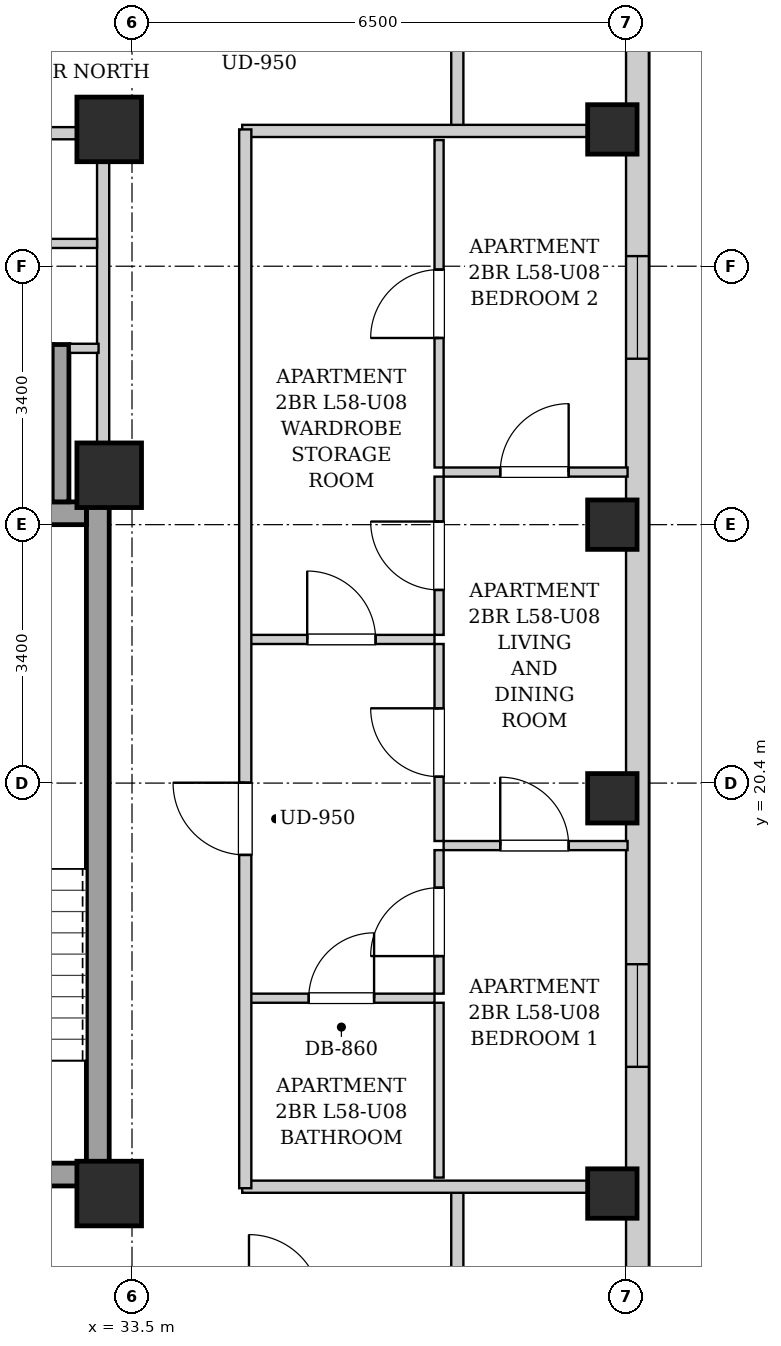
"""IFC4 building model, lengths in metres.
Left out: names, types, materials, properties, quantities, classifications, styles, units other than length and angle.
Written with IfcOpenShell. Run it as: python <this file> out.ifc"""

import sys

from ifc_helpers import new_model, si_unit, direction, frame, frame_2d, origin, origin_2d, place, context, subcontext, project, spatial, rectangle, extrude, element, fill, save


model = new_model("IFC4")
c1 = context("Model", 3, precision=1e-05, world=origin(), true_north=direction((0.0, 1.0)))
c2 = subcontext(c1, "Body", "Model", "MODEL_VIEW")
j1 = project(units=[si_unit("LENGTHUNIT", "METRE"), si_unit("PLANEANGLEUNIT", "RADIAN")], contexts=[c1])
p1 = place(None, origin())
s1 = spatial("IfcSite", under=j1, at=p1, CompositionType="ELEMENT")
p2 = place(p1, origin())
s2 = spatial("IfcBuilding", under=s1, at=p2, CompositionType="ELEMENT")
p3 = place(p2, frame((0.0, 0.0, 200.8)))
s3 = spatial("IfcBuildingStorey", under=s2, at=p3, CompositionType="ELEMENT", Elevation=200.8)
for number, where, z_axis, x_axis in (
    (1, (39.82, 15.0, 0.0), (0.0, 0.0, 1.0), (1.0, 0.0, 0.0)),
    (2, (39.82, 20.2, 0.0), (0.0, 0.0, 1.0), (1.0, 0.0, 0.0)),
    (3, (39.82, 23.8, 0.0), (0.0, 0.0, 1.0), (1.0, 0.0, 0.0)),
    (4, (39.82, 29.0, 0.0), (0.0, 0.0, 1.0), (1.0, 0.0, 0.0)),
):
    element("IfcColumn", number, at=place(p3, frame(where, z_axis=z_axis, x_axis=x_axis)), inside=s3, PredefinedType="COLUMN", context=c2, shape_type="SweptSolid", body=[
        extrude(rectangle(XDim=0.65, YDim=0.65, at=origin_2d()), origin(), (0.0, 0.0, 1.0), 3.3),
    ])
for number, where, z_axis, x_axis in (
    (5, (33.2, 15.0, 0.0), (0.0, 0.0, 1.0), (1.0, 0.0, 0.0)),
    (6, (33.2, 29.0, 0.0), (0.0, 0.0, 1.0), (1.0, 0.0, 0.0)),
    (7, (33.2, 24.45, 0.0), (0.0, 0.0, 1.0), (1.0, 0.0, 0.0)),
):
    element("IfcColumn", number, at=place(p3, frame(where, z_axis=z_axis, x_axis=x_axis)), inside=s3, PredefinedType="COLUMN", context=c2, shape_type="SweptSolid", body=[
        extrude(rectangle(XDim=0.85, YDim=0.85, at=origin_2d()), origin(), (0.0, 0.0, 1.0), 3.3),
    ])
p4 = place(p3, frame((40.15, 37.7, 0.0), z_axis=(0.0, 0.0, 1.0), x_axis=(0.0, -1.0, 0.0)))
e8 = element("IfcWall", 8, at=p4, inside=s3, PredefinedType="SOLIDWALL", context=c2, shape_type="SweptSolid", body=[
    extrude(rectangle(XDim=31.4, YDim=0.3, at=frame_2d((15.7, 0.0))), origin(), (0.0, 0.0, 1.0), 3.04),
])
p5 = place(p4, frame((1.504, 0.0, 0.55)))
e9 = element("IfcOpeningElement", 9, at=p5, cuts=e8, PredefinedType="OPENING", context=c2, shape_type="SweptSolid", body=[
    extrude(rectangle(XDim=1.35, YDim=1.2, at=frame_2d((0.675, 0.6))), frame((0.0, 0.16, 0.0), z_axis=(0.0, -1.0, 0.0), x_axis=(1.0, 0.0, 0.0)), (0.0, 0.0, 1.0), 0.32),
])
p6 = place(p4, frame((19.683, 0.0, 0.55)))
e10 = element("IfcOpeningElement", 10, at=p6, cuts=e8, PredefinedType="OPENING", context=c2, shape_type="SweptSolid", body=[
    extrude(rectangle(XDim=1.35, YDim=1.2, at=frame_2d((0.675, 0.6))), frame((0.0, 0.16, 0.0), z_axis=(0.0, -1.0, 0.0), x_axis=(1.0, 0.0, 0.0)), (0.0, 0.0, 1.0), 0.32),
])
p7 = place(p4, frame((10.367, 0.0, 0.55)))
e11 = element("IfcOpeningElement", 11, at=p7, cuts=e8, PredefinedType="OPENING", context=c2, shape_type="SweptSolid", body=[
    extrude(rectangle(XDim=1.35, YDim=1.2, at=frame_2d((0.675, 0.6))), frame((0.0, 0.16, 0.0), z_axis=(0.0, -1.0, 0.0), x_axis=(1.0, 0.0, 0.0)), (0.0, 0.0, 1.0), 0.32),
])
p8 = place(p3, frame((33.05, 15.1, 0.0), z_axis=(0.0, 0.0, 1.0), x_axis=(0.0, 1.0, 0.0)))
e12 = element("IfcWall", 12, at=p8, inside=s3, PredefinedType="SHEAR", context=c2, shape_type="SweptSolid", body=[
    extrude(rectangle(XDim=9.0, YDim=0.3, at=frame_2d((4.5, 0.0))), origin(), (0.0, 0.0, 1.0), 3.04),
])
p9 = place(p3, frame((30.05, 23.95, 0.0), z_axis=(0.0, 0.0, 1.0), x_axis=(1.0, 0.0, 0.0)))
e13 = element("IfcWall", 13, at=p9, inside=s3, PredefinedType="SHEAR", context=c2, shape_type="SweptSolid", body=[
    extrude(rectangle(XDim=2.85, YDim=0.3, at=frame_2d((1.425, 0.0))), origin(), (0.0, 0.0, 1.0), 3.04),
])
p10 = place(p3, frame((30.05, 15.25, 0.0), z_axis=(0.0, 0.0, 1.0), x_axis=(1.0, 0.0, 0.0)))
e14 = element("IfcWall", 14, at=p10, inside=s3, PredefinedType="SHEAR", context=c2, shape_type="SweptSolid", body=[
    extrude(rectangle(XDim=2.85, YDim=0.3, at=frame_2d((1.425, 0.0))), origin(), (0.0, 0.0, 1.0), 3.04),
])
p11 = place(p10, frame((0.86, 0.0, 0.0)))
e15 = element("IfcOpeningElement", 15, at=p11, cuts=e14, PredefinedType="OPENING", context=c2, shape_type="SweptSolid", body=[
    extrude(rectangle(XDim=1.1, YDim=2.05, at=frame_2d((0.55, 1.025))), frame((0.0, 0.16, 0.0), z_axis=(0.0, -1.0, 0.0), x_axis=(1.0, 0.0, 0.0)), (0.0, 0.0, 1.0), 0.32),
])
p12 = place(p3, frame((32.56, 24.1, 0.0), z_axis=(0.0, 0.0, 1.0), x_axis=(0.0, 1.0, 0.0)))
e16 = element("IfcWall", 16, at=p12, inside=s3, PredefinedType="SHEAR", context=c2, shape_type="SweptSolid", body=[
    extrude(rectangle(XDim=2.07, YDim=0.22, at=frame_2d((1.035, 0.0))), origin(), (0.0, 0.0, 1.0), 3.04),
])
p13 = place(p3, frame((33.12, 24.12, 0.0), z_axis=(0.0, 0.0, 1.0), x_axis=(0.0, 1.0, 0.0)))
e17 = element("IfcWall", 17, at=p13, inside=s3, PredefinedType="PARTITIONING", context=c2, shape_type="SweptSolid", body=[
    extrude(rectangle(XDim=4.76, YDim=0.16, at=frame_2d((2.38, 0.0))), origin(), (0.0, 0.0, 1.0), 3.04),
])
p14 = place(p3, frame((32.68, 26.12, 0.0), z_axis=(0.0, 0.0, 1.0), x_axis=(1.0, 0.0, 0.0)))
e18 = element("IfcWall", 18, at=p14, inside=s3, PredefinedType="PARTITIONING", context=c2, shape_type="SweptSolid", body=[
    extrude(rectangle(XDim=0.38, YDim=0.12, at=frame_2d((0.19, 0.0))), origin(), (0.0, 0.0, 1.0), 3.04),
])
p15 = place(p3, frame((30.12, 27.5, 0.0), z_axis=(0.0, 0.0, 1.0), x_axis=(1.0, 0.0, 0.0)))
e19 = element("IfcWall", 19, at=p15, inside=s3, PredefinedType="PARTITIONING", context=c2, shape_type="SweptSolid", body=[
    extrude(rectangle(XDim=2.92, YDim=0.12, at=frame_2d((1.46, 0.0))), origin(), (0.0, 0.0, 1.0), 3.04),
])
p16 = place(p15, frame((0.97, 0.0, 0.0)))
e20 = element("IfcOpeningElement", 20, at=p16, cuts=e19, PredefinedType="OPENING", context=c2, shape_type="SweptSolid", body=[
    extrude(rectangle(XDim=0.86, YDim=2.05, at=frame_2d((0.43, 1.025))), frame((0.0, 0.07, 0.0), z_axis=(0.0, -1.0, 0.0), x_axis=(1.0, 0.0, 0.0)), (0.0, 0.0, 1.0), 0.14),
])
p17 = place(p3, frame((25.72, 28.95, 0.0), z_axis=(0.0, 0.0, 1.0), x_axis=(1.0, 0.0, 0.0)))
e21 = element("IfcWall", 21, at=p17, inside=s3, PredefinedType="PARTITIONING", context=c2, shape_type="SweptSolid", body=[
    extrude(rectangle(XDim=7.32, YDim=0.16, at=frame_2d((3.66, 0.0))), origin(), (0.0, 0.0, 1.0), 2.556),
])
p18 = place(p17, frame((1.27, 0.0, 0.0)))
e22 = element("IfcOpeningElement", 22, at=p18, cuts=e21, PredefinedType="OPENING", context=c2, shape_type="SweptSolid", body=[
    extrude(rectangle(XDim=0.86, YDim=2.05, at=frame_2d((0.43, 1.025))), frame((0.0, 0.09, 0.0), z_axis=(0.0, -1.0, 0.0), x_axis=(1.0, 0.0, 0.0)), (0.0, 0.0, 1.0), 0.18),
])
for number, where, z_axis, x_axis in (
    (23, (37.78, 13.51, 0.0), (0.0, 0.0, 1.0), (0.0, 1.0, 0.0)),
    (24, (37.78, 28.98, 0.0), (0.0, 0.0, 1.0), (0.0, 1.0, 0.0)),
):
    element("IfcWall", number, at=place(p3, frame(where, z_axis=z_axis, x_axis=x_axis)), inside=s3, PredefinedType="PARTITIONING", context=c2, shape_type="SweptSolid", body=[
        extrude(rectangle(XDim=1.58, YDim=0.16, at=frame_2d((0.79, 0.0))), origin(), (0.0, 0.0, 1.0), 3.04),
    ])
for number, where, z_axis, x_axis in (
    (25, (34.95, 15.09, 0.0), (0.0, 0.0, 1.0), (1.0, 0.0, 0.0)),
    (26, (34.95, 28.98, 0.0), (0.0, 0.0, 1.0), (1.0, 0.0, 0.0)),
):
    element("IfcWall", number, at=place(p3, frame(where, z_axis=z_axis, x_axis=x_axis)), inside=s3, PredefinedType="PARTITIONING", context=c2, shape_type="SweptSolid", body=[
        extrude(rectangle(XDim=5.07, YDim=0.16, at=frame_2d((2.535, 0.0))), origin(), (0.0, 0.0, 1.0), 2.556),
    ])
p19 = place(p3, frame((35.03, 22.29, 0.0), z_axis=(0.0, 0.0, 1.0), x_axis=(1.0, 0.0, 0.0)))
e27 = element("IfcWall", 27, at=p19, inside=s3, PredefinedType="PARTITIONING", context=c2, shape_type="SweptSolid", body=[
    extrude(rectangle(XDim=2.45, YDim=0.12, at=frame_2d((1.225, 0.0))), origin(), (0.0, 0.0, 1.0), 3.04),
])
p20 = place(p19, frame((0.775, 0.0, 0.0)))
e28 = element("IfcOpeningElement", 28, at=p20, cuts=e27, PredefinedType="OPENING", context=c2, shape_type="SweptSolid", body=[
    extrude(rectangle(XDim=0.9, YDim=2.05, at=frame_2d((0.45, 1.025))), frame((0.0, 0.07, 0.0), z_axis=(0.0, -1.0, 0.0), x_axis=(1.0, 0.0, 0.0)), (0.0, 0.0, 1.0), 0.14),
])
p21 = place(p3, frame((37.54, 22.35, 0.0), z_axis=(0.0, 0.0, 1.0), x_axis=(0.0, 1.0, 0.0)))
e29 = element("IfcWall", 29, at=p21, inside=s3, PredefinedType="PARTITIONING", context=c2, shape_type="SweptSolid", body=[
    extrude(rectangle(XDim=2.082, YDim=0.12, at=frame_2d((1.041, 0.0))), origin(), (0.0, 0.0, 1.0), 3.04),
])
p22 = place(p21, frame((0.591, 0.0, 0.0)))
e30 = element("IfcOpeningElement", 30, at=p22, cuts=e29, PredefinedType="OPENING", context=c2, shape_type="SweptSolid", body=[
    extrude(rectangle(XDim=0.9, YDim=2.05, at=frame_2d((0.45, 1.025))), frame((0.0, 0.07, 0.0), z_axis=(0.0, -1.0, 0.0), x_axis=(1.0, 0.0, 0.0)), (0.0, 0.0, 1.0), 0.14),
])
p23 = place(p3, frame((37.54, 24.552, 0.0), z_axis=(0.0, 0.0, 1.0), x_axis=(0.0, 1.0, 0.0)))
e31 = element("IfcWall", 31, at=p23, inside=s3, PredefinedType="PARTITIONING", context=c2, shape_type="SweptSolid", body=[
    extrude(rectangle(XDim=4.308, YDim=0.12, at=frame_2d((2.154, 0.0))), origin(), (0.0, 0.0, 1.0), 3.04),
])
p24 = place(p23, frame((1.704, 0.0, 0.0)))
e32 = element("IfcOpeningElement", 32, at=p24, cuts=e31, PredefinedType="OPENING", context=c2, shape_type="SweptSolid", body=[
    extrude(rectangle(XDim=0.9, YDim=2.05, at=frame_2d((0.45, 1.025))), frame((0.0, 0.07, 0.0), z_axis=(0.0, -1.0, 0.0), x_axis=(1.0, 0.0, 0.0)), (0.0, 0.0, 1.0), 0.14),
])
p25 = place(p3, frame((35.03, 17.57, 0.0), z_axis=(0.0, 0.0, 1.0), x_axis=(1.0, 0.0, 0.0)))
e33 = element("IfcWall", 33, at=p25, inside=s3, PredefinedType="PARTITIONING", context=c2, shape_type="SweptSolid", body=[
    extrude(rectangle(XDim=2.45, YDim=0.12, at=frame_2d((1.225, 0.0))), origin(), (0.0, 0.0, 1.0), 3.04),
])
p26 = place(p25, frame((0.795, 0.0, 0.0)))
e34 = element("IfcOpeningElement", 34, at=p26, cuts=e33, PredefinedType="OPENING", context=c2, shape_type="SweptSolid", body=[
    extrude(rectangle(XDim=0.86, YDim=2.05, at=frame_2d((0.43, 1.025))), frame((0.0, 0.07, 0.0), z_axis=(0.0, -1.0, 0.0), x_axis=(1.0, 0.0, 0.0)), (0.0, 0.0, 1.0), 0.14),
])
p27 = place(p3, frame((37.54, 15.21, 0.0), z_axis=(0.0, 0.0, 1.0), x_axis=(0.0, 1.0, 0.0)))
e35 = element("IfcWall", 35, at=p27, inside=s3, PredefinedType="PARTITIONING", context=c2, shape_type="SweptSolid", body=[
    extrude(rectangle(XDim=2.3, YDim=0.12, at=frame_2d((1.15, 0.0))), origin(), (0.0, 0.0, 1.0), 3.04),
])
p28 = place(p3, frame((37.54, 17.63, 0.0), z_axis=(0.0, 0.0, 1.0), x_axis=(0.0, 1.0, 0.0)))
e36 = element("IfcWall", 36, at=p28, inside=s3, PredefinedType="PARTITIONING", context=c2, shape_type="SweptSolid", body=[
    extrude(rectangle(XDim=1.888, YDim=0.12, at=frame_2d((0.944, 0.0))), origin(), (0.0, 0.0, 1.0), 3.04),
])
p29 = place(p28, frame((0.494, 0.0, 0.0)))
e37 = element("IfcOpeningElement", 37, at=p29, cuts=e36, PredefinedType="OPENING", context=c2, shape_type="SweptSolid", body=[
    extrude(rectangle(XDim=0.9, YDim=2.05, at=frame_2d((0.45, 1.025))), frame((0.0, 0.07, 0.0), z_axis=(0.0, -1.0, 0.0), x_axis=(1.0, 0.0, 0.0)), (0.0, 0.0, 1.0), 0.14),
])
p30 = place(p3, frame((37.54, 19.638, 0.0), z_axis=(0.0, 0.0, 1.0), x_axis=(0.0, 1.0, 0.0)))
e38 = element("IfcWall", 38, at=p30, inside=s3, PredefinedType="PARTITIONING", context=c2, shape_type="SweptSolid", body=[
    extrude(rectangle(XDim=2.592, YDim=0.12, at=frame_2d((1.296, 0.0))), origin(), (0.0, 0.0, 1.0), 3.04),
])
p31 = place(p30, frame((0.846, 0.0, 0.0)))
e39 = element("IfcOpeningElement", 39, at=p31, cuts=e38, PredefinedType="OPENING", context=c2, shape_type="SweptSolid", body=[
    extrude(rectangle(XDim=0.9, YDim=2.05, at=frame_2d((0.45, 1.025))), frame((0.0, 0.07, 0.0), z_axis=(0.0, -1.0, 0.0), x_axis=(1.0, 0.0, 0.0)), (0.0, 0.0, 1.0), 0.14),
])
p32 = place(p3, frame((37.6, 19.578, 0.0), z_axis=(0.0, 0.0, 1.0), x_axis=(1.0, 0.0, 0.0)))
e40 = element("IfcWall", 40, at=p32, inside=s3, PredefinedType="PARTITIONING", context=c2, shape_type="SweptSolid", body=[
    extrude(rectangle(XDim=2.42, YDim=0.12, at=frame_2d((1.21, 0.0))), origin(), (0.0, 0.0, 1.0), 3.04),
])
p33 = place(p32, frame((0.745, 0.0, 0.0)))
e41 = element("IfcOpeningElement", 41, at=p33, cuts=e40, PredefinedType="OPENING", context=c2, shape_type="SweptSolid", body=[
    extrude(rectangle(XDim=0.9, YDim=2.05, at=frame_2d((0.45, 1.025))), frame((0.0, 0.07, 0.0), z_axis=(0.0, -1.0, 0.0), x_axis=(1.0, 0.0, 0.0)), (0.0, 0.0, 1.0), 0.14),
])
p34 = place(p3, frame((37.6, 24.492, 0.0), z_axis=(0.0, 0.0, 1.0), x_axis=(1.0, 0.0, 0.0)))
e42 = element("IfcWall", 42, at=p34, inside=s3, PredefinedType="PARTITIONING", context=c2, shape_type="SweptSolid", body=[
    extrude(rectangle(XDim=2.42, YDim=0.12, at=frame_2d((1.21, 0.0))), origin(), (0.0, 0.0, 1.0), 2.722),
])
p35 = place(p34, frame((0.745, 0.0, 0.0)))
e43 = element("IfcOpeningElement", 43, at=p35, cuts=e42, PredefinedType="OPENING", context=c2, shape_type="SweptSolid", body=[
    extrude(rectangle(XDim=0.9, YDim=2.05, at=frame_2d((0.45, 1.025))), frame((0.0, 0.07, 0.0), z_axis=(0.0, -1.0, 0.0), x_axis=(1.0, 0.0, 0.0)), (0.0, 0.0, 1.0), 0.14),
])
p36 = place(p3, frame((34.99, 15.07, 0.0), z_axis=(0.0, 0.0, 1.0), x_axis=(0.0, 1.0, 0.0)))
e44 = element("IfcWall", 44, at=p36, inside=s3, PredefinedType="PARTITIONING", context=c2, shape_type="SweptSolid", body=[
    extrude(rectangle(XDim=13.93, YDim=0.16, at=frame_2d((6.965, 0.0))), origin(), (0.0, 0.0, 1.0), 3.04),
])
p37 = place(p36, frame((4.385, 0.0, 0.0)))
e45 = element("IfcOpeningElement", 45, at=p37, cuts=e44, PredefinedType="OPENING", context=c2, shape_type="SweptSolid", body=[
    extrude(rectangle(XDim=0.95, YDim=2.1, at=frame_2d((0.475, 1.05))), frame((0.0, 0.09, 0.0), z_axis=(0.0, -1.0, 0.0), x_axis=(1.0, 0.0, 0.0)), (0.0, 0.0, 1.0), 0.18),
])
p38 = place(p20, origin())
e46 = element("IfcDoor", 46, at=p38, inside=s3, OperationType="SINGLE_SWING_LEFT", PredefinedType="DOOR", context=c2, shape_type="SweptSolid", body=[
    extrude(rectangle(XDim=0.9, YDim=2.05, at=frame_2d((0.45, 1.025))), frame((0.0, 0.025, 0.0), z_axis=(0.0, -1.0, 0.0), x_axis=(1.0, 0.0, 0.0)), (0.0, 0.0, 1.0), 0.05),
])
fill(e28, e46)
p39 = place(p22, origin())
e47 = element("IfcDoor", 47, at=p39, inside=s3, OperationType="SINGLE_SWING_RIGHT", PredefinedType="DOOR", context=c2, shape_type="SweptSolid", body=[
    extrude(rectangle(XDim=0.9, YDim=2.05, at=frame_2d((0.45, 1.025))), frame((0.0, 0.025, 0.0), z_axis=(0.0, -1.0, 0.0), x_axis=(1.0, 0.0, 0.0)), (0.0, 0.0, 1.0), 0.05),
])
fill(e30, e47)
p40 = place(p24, origin())
e48 = element("IfcDoor", 48, at=p40, inside=s3, OperationType="SINGLE_SWING_LEFT", PredefinedType="DOOR", context=c2, shape_type="SweptSolid", body=[
    extrude(rectangle(XDim=0.9, YDim=2.05, at=frame_2d((0.45, 1.025))), frame((0.0, 0.025, 0.0), z_axis=(0.0, -1.0, 0.0), x_axis=(1.0, 0.0, 0.0)), (0.0, 0.0, 1.0), 0.05),
])
fill(e32, e48)
p41 = place(p26, origin())
e49 = element("IfcDoor", 49, at=p41, inside=s3, OperationType="SINGLE_SWING_RIGHT", PredefinedType="DOOR", context=c2, shape_type="SweptSolid", body=[
    extrude(rectangle(XDim=0.86, YDim=2.05, at=frame_2d((0.43, 1.025))), frame((0.0, 0.025, 0.0), z_axis=(0.0, -1.0, 0.0), x_axis=(1.0, 0.0, 0.0)), (0.0, 0.0, 1.0), 0.05),
])
fill(e34, e49)
p42 = place(p29, origin())
e50 = element("IfcDoor", 50, at=p42, inside=s3, OperationType="SINGLE_SWING_LEFT", PredefinedType="DOOR", context=c2, shape_type="SweptSolid", body=[
    extrude(rectangle(XDim=0.9, YDim=2.05, at=frame_2d((0.45, 1.025))), frame((0.0, 0.025, 0.0), z_axis=(0.0, -1.0, 0.0), x_axis=(1.0, 0.0, 0.0)), (0.0, 0.0, 1.0), 0.05),
])
fill(e37, e50)
p43 = place(p31, origin())
e51 = element("IfcDoor", 51, at=p43, inside=s3, OperationType="SINGLE_SWING_RIGHT", PredefinedType="DOOR", context=c2, shape_type="SweptSolid", body=[
    extrude(rectangle(XDim=0.9, YDim=2.05, at=frame_2d((0.45, 1.025))), frame((0.0, 0.025, 0.0), z_axis=(0.0, -1.0, 0.0), x_axis=(1.0, 0.0, 0.0)), (0.0, 0.0, 1.0), 0.05),
])
fill(e39, e51)
p44 = place(p33, origin())
e52 = element("IfcDoor", 52, at=p44, inside=s3, OperationType="SINGLE_SWING_LEFT", PredefinedType="DOOR", context=c2, shape_type="SweptSolid", body=[
    extrude(rectangle(XDim=0.9, YDim=2.05, at=frame_2d((0.45, 1.025))), frame((0.0, 0.025, 0.0), z_axis=(0.0, -1.0, 0.0), x_axis=(1.0, 0.0, 0.0)), (0.0, 0.0, 1.0), 0.05),
])
fill(e41, e52)
p45 = place(p35, origin())
e53 = element("IfcDoor", 53, at=p45, inside=s3, OperationType="SINGLE_SWING_RIGHT", PredefinedType="DOOR", context=c2, shape_type="SweptSolid", body=[
    extrude(rectangle(XDim=0.9, YDim=2.05, at=frame_2d((0.45, 1.025))), frame((0.0, 0.025, 0.0), z_axis=(0.0, -1.0, 0.0), x_axis=(1.0, 0.0, 0.0)), (0.0, 0.0, 1.0), 0.05),
])
fill(e43, e53)
p46 = place(p37, origin())
e54 = element("IfcDoor", 54, at=p46, inside=s3, OperationType="SINGLE_SWING_RIGHT", PredefinedType="DOOR", context=c2, shape_type="SweptSolid", body=[
    extrude(rectangle(XDim=0.95, YDim=2.1, at=frame_2d((0.475, 1.05))), frame((0.0, 0.025, 0.0), z_axis=(0.0, -1.0, 0.0), x_axis=(1.0, 0.0, 0.0)), (0.0, 0.0, 1.0), 0.05),
])
fill(e45, e54)
p47 = place(p6, origin())
e55 = element("IfcWindow", 55, at=p47, inside=s3, PartitioningType="SINGLE_PANEL", PredefinedType="WINDOW", context=c2, shape_type="SweptSolid", body=[
    extrude(rectangle(XDim=1.35, YDim=1.2, at=frame_2d((0.675, 0.6))), frame((0.0, 0.03, 0.0), z_axis=(0.0, -1.0, 0.0), x_axis=(1.0, 0.0, 0.0)), (0.0, 0.0, 1.0), 0.06),
])
fill(e10, e55)
p48 = place(p7, origin())
e56 = element("IfcWindow", 56, at=p48, inside=s3, PartitioningType="SINGLE_PANEL", PredefinedType="WINDOW", context=c2, shape_type="SweptSolid", body=[
    extrude(rectangle(XDim=1.35, YDim=1.2, at=frame_2d((0.675, 0.6))), frame((0.0, 0.03, 0.0), z_axis=(0.0, -1.0, 0.0), x_axis=(1.0, 0.0, 0.0)), (0.0, 0.0, 1.0), 0.06),
])
fill(e11, e56)
save(model, sys.argv[1])
